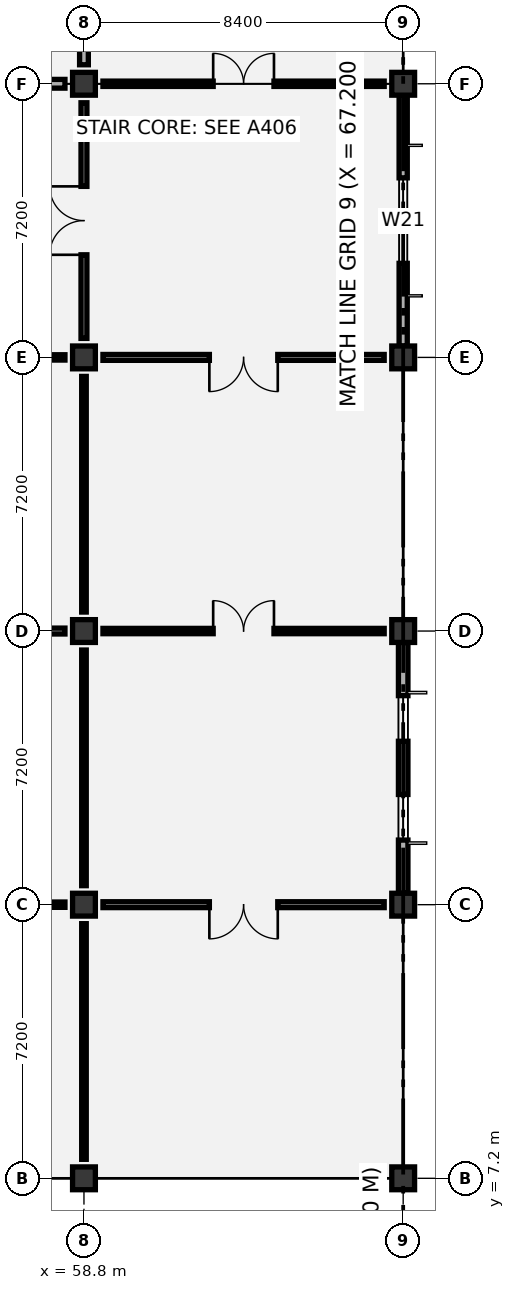
"""IFC4 building model, lengths in metres.
Left out: names, types, materials, properties, quantities, classifications, styles, units other than length and angle.
Written with IfcOpenShell. Run it as: python <this file> out.ifc"""

import sys

from ifc_helpers import new_model, si_unit, direction, frame, frame_2d, origin, origin_2d, place, context, subcontext, project, spatial, rectangle, extrude, element, fill, save


model = new_model("IFC4")
c1 = context("Model", 3, precision=1e-05, world=origin(), true_north=direction((0.0, 1.0)))
c2 = subcontext(c1, "Body", "Model", "MODEL_VIEW")
j1 = project(units=[si_unit("LENGTHUNIT", "METRE"), si_unit("PLANEANGLEUNIT", "RADIAN")], contexts=[c1])
p1 = place(None, origin())
s1 = spatial("IfcSite", under=j1, at=p1, CompositionType="ELEMENT")
p2 = place(p1, origin())
s2 = spatial("IfcBuilding", under=s1, at=p2, CompositionType="ELEMENT")
p3 = place(p2, frame((0.0, 0.0, 16.8)))
s3 = spatial("IfcBuildingStorey", under=s2, at=p3, CompositionType="ELEMENT", Elevation=16.8)
for number, where, z_axis, x_axis in (
    (1, (58.8, 7.2, 0.0), (0.0, 0.0, 1.0), (1.0, 0.0, 0.0)),
    (2, (58.8, 14.4, 0.0), (0.0, 0.0, 1.0), (1.0, 0.0, 0.0)),
    (3, (58.8, 21.6, 0.0), (0.0, 0.0, 1.0), (1.0, 0.0, 0.0)),
    (4, (58.8, 28.8, 0.0), (0.0, 0.0, 1.0), (1.0, 0.0, 0.0)),
    (5, (58.8, 36.0, 0.0), (0.0, 0.0, 1.0), (1.0, 0.0, 0.0)),
    (6, (67.2, 7.2, 0.0), (0.0, 0.0, 1.0), (1.0, 0.0, 0.0)),
    (7, (67.2, 14.4, 0.0), (0.0, 0.0, 1.0), (1.0, 0.0, 0.0)),
    (8, (67.2, 21.6, 0.0), (0.0, 0.0, 1.0), (1.0, 0.0, 0.0)),
    (9, (67.2, 28.8, 0.0), (0.0, 0.0, 1.0), (1.0, 0.0, 0.0)),
    (10, (67.2, 36.0, 0.0), (0.0, 0.0, 1.0), (1.0, 0.0, 0.0)),
):
    element("IfcColumn", number, at=place(p3, frame(where, z_axis=z_axis, x_axis=x_axis)), inside=s3, PredefinedType="COLUMN", context=c2, shape_type="SweptSolid", body=[
        extrude(rectangle(XDim=0.6, YDim=0.6, at=origin_2d()), origin(), (0.0, 0.0, 1.0), 5.05),
    ])
p4 = place(p3, frame((67.2, 14.7, 0.0), z_axis=(0.0, 0.0, 1.0), x_axis=(0.0, 1.0, 0.0)))
e11 = element("IfcWall", 11, at=p4, inside=s3, PredefinedType="SOLIDWALL", context=c2, shape_type="SweptSolid", body=[
    extrude(rectangle(XDim=6.6, YDim=0.25, at=frame_2d((3.3, 0.0))), origin(), (0.0, 0.0, 1.0), 4.17),
])
p5 = place(p4, frame((1.4, 0.0, 0.9)))
e12 = element("IfcOpeningElement", 12, at=p5, cuts=e11, PredefinedType="OPENING", context=c2, shape_type="SweptSolid", body=[
    extrude(rectangle(XDim=1.2, YDim=1.8, at=frame_2d((0.6, 0.9))), frame((0.0, 0.135, 0.0), z_axis=(0.0, -1.0, 0.0), x_axis=(1.0, 0.0, 0.0)), (0.0, 0.0, 1.0), 0.27),
])
p6 = place(p4, frame((4.0, 0.0, 0.9)))
e13 = element("IfcOpeningElement", 13, at=p6, cuts=e11, PredefinedType="OPENING", context=c2, shape_type="SweptSolid", body=[
    extrude(rectangle(XDim=1.2, YDim=1.8, at=frame_2d((0.6, 0.9))), frame((0.0, 0.135, 0.0), z_axis=(0.0, -1.0, 0.0), x_axis=(1.0, 0.0, 0.0)), (0.0, 0.0, 1.0), 0.27),
])
p7 = place(p3, frame((67.2, 29.1, 0.0), z_axis=(0.0, 0.0, 1.0), x_axis=(0.0, 1.0, 0.0)))
e14 = element("IfcWall", 14, at=p7, inside=s3, PredefinedType="SOLIDWALL", context=c2, shape_type="SweptSolid", body=[
    extrude(rectangle(XDim=6.6, YDim=0.215, at=frame_2d((3.3, 0.0))), origin(), (0.0, 0.0, 1.0), 4.17),
])
p8 = place(p7, frame((2.175, 0.0, 0.9)))
e15 = element("IfcOpeningElement", 15, at=p8, cuts=e14, PredefinedType="OPENING", context=c2, shape_type="SweptSolid", body=[
    extrude(rectangle(XDim=2.25, YDim=1.95, at=frame_2d((1.125, 0.975))), frame((0.0, 0.117, 0.0), z_axis=(0.0, -1.0, 0.0), x_axis=(1.0, 0.0, 0.0)), (0.0, 0.0, 1.0), 0.235),
])
p9 = place(p3, frame((67.2, 0.12, 0.0), z_axis=(0.0, 0.0, 1.0), x_axis=(0.0, 1.0, 0.0)))
e16 = element("IfcWall", 16, at=p9, inside=s3, PredefinedType="PARAPET", context=c2, shape_type="SweptSolid", body=[
    extrude(rectangle(XDim=6.96, YDim=0.22, at=frame_2d((3.48, 0.0))), origin(), (0.0, 0.0, 1.0), 1.15),
])
p10 = place(p3, frame((58.8, 7.7, 0.0), z_axis=(0.0, 0.0, 1.0), x_axis=(0.0, 1.0, 0.0)))
e17 = element("IfcWall", 17, at=p10, inside=s3, PredefinedType="PARTITIONING", context=c2, shape_type="SweptSolid", body=[
    extrude(rectangle(XDim=6.2, YDim=0.12, at=frame_2d((3.1, 0.0))), origin(), (0.0, 0.0, 1.0), 4.12),
])
p11 = place(p3, frame((50.9, 14.4, 0.0), z_axis=(0.0, 0.0, 1.0), x_axis=(1.0, 0.0, 0.0)))
e18 = element("IfcWall", 18, at=p11, inside=s3, PredefinedType="PARTITIONING", context=c2, shape_type="SweptSolid", body=[
    extrude(rectangle(XDim=7.4, YDim=0.14, at=frame_2d((3.7, 0.0))), origin(), (0.0, 0.0, 1.0), 4.07),
])
p12 = place(p11, frame((2.9, 0.0, 0.0)))
e19 = element("IfcOpeningElement", 19, at=p12, cuts=e18, PredefinedType="OPENING", context=c2, shape_type="SweptSolid", body=[
    extrude(rectangle(XDim=1.6, YDim=2.2, at=frame_2d((0.8, 1.1))), frame((0.0, 0.08, 0.0), z_axis=(0.0, -1.0, 0.0), x_axis=(1.0, 0.0, 0.0)), (0.0, 0.0, 1.0), 0.16),
])
p13 = place(p3, frame((58.8, 14.9, 0.0), z_axis=(0.0, 0.0, 1.0), x_axis=(0.0, 1.0, 0.0)))
e20 = element("IfcWall", 20, at=p13, inside=s3, PredefinedType="PARTITIONING", context=c2, shape_type="SweptSolid", body=[
    extrude(rectangle(XDim=6.2, YDim=0.12, at=frame_2d((3.1, 0.0))), origin(), (0.0, 0.0, 1.0), 4.42),
])
p14 = place(p3, frame((50.9, 21.6, 0.0), z_axis=(0.0, 0.0, 1.0), x_axis=(1.0, 0.0, 0.0)))
e21 = element("IfcWall", 21, at=p14, inside=s3, PredefinedType="PARTITIONING", context=c2, shape_type="SweptSolid", body=[
    extrude(rectangle(XDim=7.4, YDim=0.155, at=frame_2d((3.7, 0.0))), origin(), (0.0, 0.0, 1.0), 4.07),
])
p15 = place(p14, frame((2.8, 0.0, 0.0)))
e22 = element("IfcOpeningElement", 22, at=p15, cuts=e21, PredefinedType="OPENING", context=c2, shape_type="SweptSolid", body=[
    extrude(rectangle(XDim=1.8, YDim=2.25, at=frame_2d((0.9, 1.125))), frame((0.0, 0.087, 0.0), z_axis=(0.0, -1.0, 0.0), x_axis=(1.0, 0.0, 0.0)), (0.0, 0.0, 1.0), 0.175),
])
p16 = place(p3, frame((58.8, 22.1, 0.0), z_axis=(0.0, 0.0, 1.0), x_axis=(0.0, 1.0, 0.0)))
e23 = element("IfcWall", 23, at=p16, inside=s3, PredefinedType="PARTITIONING", context=c2, shape_type="SweptSolid", body=[
    extrude(rectangle(XDim=6.2, YDim=0.12, at=frame_2d((3.1, 0.0))), origin(), (0.0, 0.0, 1.0), 4.12),
])
p17 = place(p3, frame((50.9, 28.8, 0.0), z_axis=(0.0, 0.0, 1.0), x_axis=(1.0, 0.0, 0.0)))
e24 = element("IfcWall", 24, at=p17, inside=s3, PredefinedType="PARTITIONING", context=c2, shape_type="SweptSolid", body=[
    extrude(rectangle(XDim=7.4, YDim=0.14, at=frame_2d((3.7, 0.0))), origin(), (0.0, 0.0, 1.0), 4.07),
])
p18 = place(p17, frame((2.9, 0.0, 0.0)))
e25 = element("IfcOpeningElement", 25, at=p18, cuts=e24, PredefinedType="OPENING", context=c2, shape_type="SweptSolid", body=[
    extrude(rectangle(XDim=1.6, YDim=2.2, at=frame_2d((0.8, 1.1))), frame((0.0, 0.08, 0.0), z_axis=(0.0, -1.0, 0.0), x_axis=(1.0, 0.0, 0.0)), (0.0, 0.0, 1.0), 0.16),
])
p19 = place(p3, frame((58.8, 29.3, 0.0), z_axis=(0.0, 0.0, 1.0), x_axis=(0.0, 1.0, 0.0)))
e26 = element("IfcWall", 26, at=p19, inside=s3, PredefinedType="PARTITIONING", context=c2, shape_type="SweptSolid", body=[
    extrude(rectangle(XDim=6.2, YDim=0.155, at=frame_2d((3.1, 0.0))), origin(), (0.0, 0.0, 1.0), 4.53),
])
p20 = place(p19, frame((2.2, 0.0, 0.0)))
e27 = element("IfcOpeningElement", 27, at=p20, cuts=e26, PredefinedType="OPENING", context=c2, shape_type="SweptSolid", body=[
    extrude(rectangle(XDim=1.8, YDim=2.25, at=frame_2d((0.9, 1.125))), frame((0.0, 0.087, 0.0), z_axis=(0.0, -1.0, 0.0), x_axis=(1.0, 0.0, 0.0)), (0.0, 0.0, 1.0), 0.175),
])
p21 = place(p3, frame((50.9, 36.0, 0.0), z_axis=(0.0, 0.0, 1.0), x_axis=(1.0, 0.0, 0.0)))
e28 = element("IfcWall", 28, at=p21, inside=s3, PredefinedType="PARTITIONING", context=c2, shape_type="SweptSolid", body=[
    extrude(rectangle(XDim=7.4, YDim=0.23, at=frame_2d((3.7, 0.0))), origin(), (0.0, 0.0, 1.0), 4.07),
])
p22 = place(p21, frame((2.95, 0.0, 0.0)))
e29 = element("IfcOpeningElement", 29, at=p22, cuts=e28, PredefinedType="OPENING", context=c2, shape_type="SweptSolid", body=[
    extrude(rectangle(XDim=1.5, YDim=2.15, at=frame_2d((0.75, 1.075))), frame((0.0, 0.125, 0.0), z_axis=(0.0, -1.0, 0.0), x_axis=(1.0, 0.0, 0.0)), (0.0, 0.0, 1.0), 0.25),
])
p23 = place(p3, frame((58.8, 36.5, 0.0), z_axis=(0.0, 0.0, 1.0), x_axis=(0.0, 1.0, 0.0)))
e30 = element("IfcWall", 30, at=p23, inside=s3, PredefinedType="PARTITIONING", context=c2, shape_type="SweptSolid", body=[
    extrude(rectangle(XDim=6.2, YDim=0.23, at=frame_2d((3.1, 0.0))), origin(), (0.0, 0.0, 1.0), 4.12),
])
p24 = place(p3, frame((59.3, 14.4, 0.0), z_axis=(0.0, 0.0, 1.0), x_axis=(1.0, 0.0, 0.0)))
e31 = element("IfcWall", 31, at=p24, inside=s3, PredefinedType="PARTITIONING", context=c2, shape_type="SweptSolid", body=[
    extrude(rectangle(XDim=7.4, YDim=0.155, at=frame_2d((3.7, 0.0))), origin(), (0.0, 0.0, 1.0), 4.07),
])
p25 = place(p24, frame((2.8, 0.0, 0.0)))
e32 = element("IfcOpeningElement", 32, at=p25, cuts=e31, PredefinedType="OPENING", context=c2, shape_type="SweptSolid", body=[
    extrude(rectangle(XDim=1.8, YDim=2.25, at=frame_2d((0.9, 1.125))), frame((0.0, 0.087, 0.0), z_axis=(0.0, -1.0, 0.0), x_axis=(1.0, 0.0, 0.0)), (0.0, 0.0, 1.0), 0.175),
])
p26 = place(p3, frame((59.3, 21.6, 0.0), z_axis=(0.0, 0.0, 1.0), x_axis=(1.0, 0.0, 0.0)))
e33 = element("IfcWall", 33, at=p26, inside=s3, PredefinedType="PARTITIONING", context=c2, shape_type="SweptSolid", body=[
    extrude(rectangle(XDim=7.4, YDim=0.14, at=frame_2d((3.7, 0.0))), origin(), (0.0, 0.0, 1.0), 4.07),
])
p27 = place(p26, frame((2.9, 0.0, 0.0)))
e34 = element("IfcOpeningElement", 34, at=p27, cuts=e33, PredefinedType="OPENING", context=c2, shape_type="SweptSolid", body=[
    extrude(rectangle(XDim=1.6, YDim=2.2, at=frame_2d((0.8, 1.1))), frame((0.0, 0.08, 0.0), z_axis=(0.0, -1.0, 0.0), x_axis=(1.0, 0.0, 0.0)), (0.0, 0.0, 1.0), 0.16),
])
p28 = place(p3, frame((59.3, 28.8, 0.0), z_axis=(0.0, 0.0, 1.0), x_axis=(1.0, 0.0, 0.0)))
e35 = element("IfcWall", 35, at=p28, inside=s3, PredefinedType="PARTITIONING", context=c2, shape_type="SweptSolid", body=[
    extrude(rectangle(XDim=7.4, YDim=0.155, at=frame_2d((3.7, 0.0))), origin(), (0.0, 0.0, 1.0), 4.07),
])
p29 = place(p28, frame((2.8, 0.0, 0.0)))
e36 = element("IfcOpeningElement", 36, at=p29, cuts=e35, PredefinedType="OPENING", context=c2, shape_type="SweptSolid", body=[
    extrude(rectangle(XDim=1.8, YDim=2.25, at=frame_2d((0.9, 1.125))), frame((0.0, 0.087, 0.0), z_axis=(0.0, -1.0, 0.0), x_axis=(1.0, 0.0, 0.0)), (0.0, 0.0, 1.0), 0.175),
])
p30 = place(p3, frame((59.3, 36.0, 0.0), z_axis=(0.0, 0.0, 1.0), x_axis=(1.0, 0.0, 0.0)))
e37 = element("IfcWall", 37, at=p30, inside=s3, PredefinedType="PARTITIONING", context=c2, shape_type="SweptSolid", body=[
    extrude(rectangle(XDim=7.4, YDim=0.14, at=frame_2d((3.7, 0.0))), origin(), (0.0, 0.0, 1.0), 4.07),
])
p31 = place(p30, frame((2.9, 0.0, 0.0)))
e38 = element("IfcOpeningElement", 38, at=p31, cuts=e37, PredefinedType="OPENING", context=c2, shape_type="SweptSolid", body=[
    extrude(rectangle(XDim=1.6, YDim=2.2, at=frame_2d((0.8, 1.1))), frame((0.0, 0.08, 0.0), z_axis=(0.0, -1.0, 0.0), x_axis=(1.0, 0.0, 0.0)), (0.0, 0.0, 1.0), 0.16),
])
p32 = place(p5, origin())
e39 = element("IfcWindow", 39, at=p32, inside=s3, PartitioningType="SINGLE_PANEL", PredefinedType="WINDOW", context=c2, shape_type="SweptSolid", body=[
    extrude(rectangle(XDim=1.2, YDim=1.8, at=frame_2d((0.6, 0.9))), frame((0.0, 0.03, 0.0), z_axis=(0.0, -1.0, 0.0), x_axis=(1.0, 0.0, 0.0)), (0.0, 0.0, 1.0), 0.06),
])
fill(e12, e39)
p33 = place(p6, origin())
e40 = element("IfcWindow", 40, at=p33, inside=s3, PartitioningType="SINGLE_PANEL", PredefinedType="WINDOW", context=c2, shape_type="SweptSolid", body=[
    extrude(rectangle(XDim=1.2, YDim=1.8, at=frame_2d((0.6, 0.9))), frame((0.0, 0.03, 0.0), z_axis=(0.0, -1.0, 0.0), x_axis=(1.0, 0.0, 0.0)), (0.0, 0.0, 1.0), 0.06),
])
fill(e13, e40)
p34 = place(p8, origin())
e41 = element("IfcWindow", 41, at=p34, inside=s3, PartitioningType="SINGLE_PANEL", PredefinedType="WINDOW", context=c2, shape_type="SweptSolid", body=[
    extrude(rectangle(XDim=2.25, YDim=1.95, at=frame_2d((1.125, 0.975))), frame((0.0, 0.03, 0.0), z_axis=(0.0, -1.0, 0.0), x_axis=(1.0, 0.0, 0.0)), (0.0, 0.0, 1.0), 0.06),
])
fill(e15, e41)
p35 = place(p20, origin())
e42 = element("IfcDoor", 42, at=p35, inside=s3, OperationType="DOUBLE_DOOR_SINGLE_SWING", PredefinedType="DOOR", context=c2, shape_type="SweptSolid", body=[
    extrude(rectangle(XDim=1.8, YDim=2.25, at=frame_2d((0.9, 1.125))), frame((0.0, 0.025, 0.0), z_axis=(0.0, -1.0, 0.0), x_axis=(1.0, 0.0, 0.0)), (0.0, 0.0, 1.0), 0.05),
])
fill(e27, e42)
p36 = place(p25, frame((1.8, 0.0, 0.0), z_axis=(0.0, 0.0, 1.0), x_axis=(-1.0, 0.0, 0.0)))
e43 = element("IfcDoor", 43, at=p36, inside=s3, OperationType="DOUBLE_DOOR_SINGLE_SWING", PredefinedType="DOOR", context=c2, shape_type="SweptSolid", body=[
    extrude(rectangle(XDim=1.8, YDim=2.25, at=frame_2d((0.9, 1.125))), frame((0.0, 0.025, 0.0), z_axis=(0.0, -1.0, 0.0), x_axis=(1.0, 0.0, 0.0)), (0.0, 0.0, 1.0), 0.05),
])
fill(e32, e43)
p37 = place(p27, origin())
e44 = element("IfcDoor", 44, at=p37, inside=s3, OperationType="DOUBLE_DOOR_SINGLE_SWING", PredefinedType="DOOR", context=c2, shape_type="SweptSolid", body=[
    extrude(rectangle(XDim=1.6, YDim=2.2, at=frame_2d((0.8, 1.1))), frame((0.0, 0.025, 0.0), z_axis=(0.0, -1.0, 0.0), x_axis=(1.0, 0.0, 0.0)), (0.0, 0.0, 1.0), 0.05),
])
fill(e34, e44)
p38 = place(p29, frame((1.8, 0.0, 0.0), z_axis=(0.0, 0.0, 1.0), x_axis=(-1.0, 0.0, 0.0)))
e45 = element("IfcDoor", 45, at=p38, inside=s3, OperationType="DOUBLE_DOOR_SINGLE_SWING", PredefinedType="DOOR", context=c2, shape_type="SweptSolid", body=[
    extrude(rectangle(XDim=1.8, YDim=2.25, at=frame_2d((0.9, 1.125))), frame((0.0, 0.025, 0.0), z_axis=(0.0, -1.0, 0.0), x_axis=(1.0, 0.0, 0.0)), (0.0, 0.0, 1.0), 0.05),
])
fill(e36, e45)
p39 = place(p31, origin())
e46 = element("IfcDoor", 46, at=p39, inside=s3, OperationType="DOUBLE_DOOR_SINGLE_SWING", PredefinedType="DOOR", context=c2, shape_type="SweptSolid", body=[
    extrude(rectangle(XDim=1.6, YDim=2.2, at=frame_2d((0.8, 1.1))), frame((0.0, 0.025, 0.0), z_axis=(0.0, -1.0, 0.0), x_axis=(1.0, 0.0, 0.0)), (0.0, 0.0, 1.0), 0.05),
])
fill(e38, e46)
save(model, sys.argv[1])
